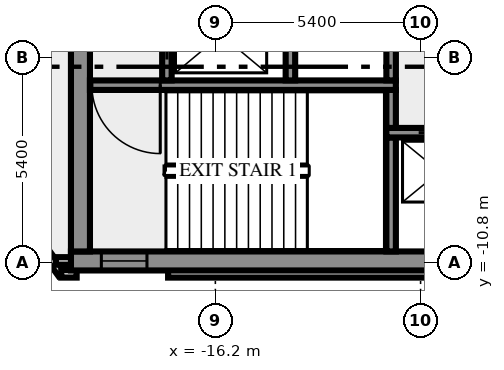
"""IFC4 building model, lengths in metres.
Left out: names, types, materials, properties, quantities, classifications, styles, units other than length and angle.
Written with IfcOpenShell. Run it as: python <this file> out.ifc"""

import sys

from ifc_helpers import new_model, si_unit, direction, frame, frame_2d, origin, place, context, subcontext, project, spatial, rectangle, extrude, element, fill, save


model = new_model("IFC4")
c1 = context("Model", 3, precision=1e-05, world=origin(), true_north=direction((0.0, 1.0)))
c2 = subcontext(c1, "Body", "Model", "MODEL_VIEW")
j1 = project(units=[si_unit("LENGTHUNIT", "METRE"), si_unit("PLANEANGLEUNIT", "RADIAN")], contexts=[c1])
p1 = place(None, origin())
s1 = spatial("IfcSite", under=j1, at=p1, CompositionType="ELEMENT")
p2 = place(p1, origin())
s2 = spatial("IfcBuilding", under=s1, at=p2, CompositionType="ELEMENT")
p3 = place(p2, frame((0.0, 0.0, 51.0)))
s3 = spatial("IfcBuildingStorey", under=s2, at=p3, CompositionType="ELEMENT", Elevation=51.0)
p4 = place(p3, frame((-21.833, -8.909, 0.0), z_axis=(0.0, 0.0, 1.0), x_axis=(0.587766567315, -0.809030569476, 0.0)))
e1 = element("IfcWall", 1, at=p4, inside=s3, PredefinedType="SOLIDWALL", context=c2, shape_type="SweptSolid", body=[
    extrude(rectangle(XDim=2.688, YDim=0.2, at=frame_2d((1.344, 0.0))), origin(), (0.0, 0.0, 1.0), 3.65),
])
p5 = place(p3, frame((-20.256, -11.088, 0.0), z_axis=(0.0, 0.0, 1.0), x_axis=(1.0, 0.0, 0.0)))
e2 = element("IfcWall", 2, at=p5, inside=s3, PredefinedType="SOLIDWALL", context=c2, shape_type="SweptSolid", body=[
    extrude(rectangle(XDim=0.406, YDim=0.2, at=frame_2d((0.203, 0.0))), origin(), (0.0, 0.0, 1.0), 3.65),
])
p6 = place(p3, frame((-17.444, -11.088, 0.0), z_axis=(0.0, 0.0, 1.0), x_axis=(1.0, 0.0, 0.0)))
e3 = element("IfcWall", 3, at=p6, inside=s3, PredefinedType="SOLIDWALL", context=c2, shape_type="SweptSolid", body=[
    extrude(rectangle(XDim=34.888, YDim=0.2, at=frame_2d((17.444, 0.0))), origin(), (0.0, 0.0, 1.0), 3.65),
])
p7 = place(p3, frame((-19.98, -10.75, 0.0), z_axis=(0.0, 0.0, 1.0), x_axis=(-1.0, 0.0, 0.0)))
e4 = element("IfcWall", 4, at=p7, inside=s3, PredefinedType="SOLIDWALL", context=c2, shape_type="SweptSolid", body=[
    extrude(rectangle(XDim=0.417, YDim=0.2, at=frame_2d((0.208, 0.0))), origin(), (0.0, 0.0, 1.0), 3.65),
])
p8 = place(p3, frame((-20.0, -10.75, 0.0), z_axis=(0.0, 0.0, 1.0), x_axis=(1.0, 0.0, 0.0)))
e5 = element("IfcWall", 5, at=p8, inside=s3, PredefinedType="SHEAR", context=c2, shape_type="SweptSolid", body=[
    extrude(rectangle(XDim=40.0, YDim=0.5, at=frame_2d((20.0, 0.0))), origin(), (0.0, 0.0, 1.0), 3.65),
])
p9 = place(p8, frame((0.8, 0.0, 1.0)))
e6 = element("IfcOpeningElement", 6, at=p9, cuts=e5, PredefinedType="OPENING", context=c2, shape_type="SweptSolid", body=[
    extrude(rectangle(XDim=1.2, YDim=1.2, at=frame_2d((0.6, 0.6))), frame((0.0, 0.26, 0.0), z_axis=(0.0, -1.0, 0.0), x_axis=(1.0, 0.0, 0.0)), (0.0, 0.0, 1.0), 0.52),
])
p10 = place(p8, frame((38.0, 0.0, 1.0)))
e7 = element("IfcOpeningElement", 7, at=p10, cuts=e5, PredefinedType="OPENING", context=c2, shape_type="SweptSolid", body=[
    extrude(rectangle(XDim=1.2, YDim=1.2, at=frame_2d((0.6, 0.6))), frame((0.0, 0.26, 0.0), z_axis=(0.0, -1.0, 0.0), x_axis=(1.0, 0.0, 0.0)), (0.0, 0.0, 1.0), 0.52),
])
p11 = place(p3, frame((-19.75, -10.5, 0.0), z_axis=(0.0, 0.0, 1.0), x_axis=(0.0, 1.0, 0.0)))
e8 = element("IfcWall", 8, at=p11, inside=s3, PredefinedType="SHEAR", context=c2, shape_type="SweptSolid", body=[
    extrude(rectangle(XDim=8.8, YDim=0.5, at=frame_2d((4.4, 0.0))), origin(), (0.0, 0.0, 1.0), 3.65),
])
p12 = place(p3, frame((-11.575, -10.5, 0.0), z_axis=(0.0, 0.0, 1.0), x_axis=(0.0, 1.0, 0.0)))
e9 = element("IfcWall", 9, at=p12, inside=s3, PredefinedType="SHEAR", context=c2, shape_type="SweptSolid", body=[
    extrude(rectangle(XDim=3.0, YDim=0.25, at=frame_2d((1.5, 0.0))), origin(), (0.0, 0.0, 1.0), 3.65),
])
p13 = place(p3, frame((11.7, -7.375, 0.0), z_axis=(0.0, 0.0, 1.0), x_axis=(-1.0, 0.0, 0.0)))
e10 = element("IfcWall", 10, at=p13, inside=s3, PredefinedType="SHEAR", context=c2, shape_type="SweptSolid", body=[
    extrude(rectangle(XDim=23.4, YDim=0.25, at=frame_2d((11.7, 0.0))), origin(), (0.0, 0.0, 1.0), 3.65),
])
p14 = place(p13, frame((21.45, 0.0, 0.0)))
e11 = element("IfcOpeningElement", 11, at=p14, cuts=e10, PredefinedType="OPENING", context=c2, shape_type="SweptSolid", body=[
    extrude(rectangle(XDim=1.1, YDim=2.1, at=frame_2d((0.55, 1.05))), frame((0.0, 0.135, 0.0), z_axis=(0.0, -1.0, 0.0), x_axis=(1.0, 0.0, 0.0)), (0.0, 0.0, 1.0), 0.27),
])
p15 = place(p13, frame((18.95, 0.0, 0.0)))
e12 = element("IfcOpeningElement", 12, at=p15, cuts=e10, PredefinedType="OPENING", context=c2, shape_type="SweptSolid", body=[
    extrude(rectangle(XDim=1.1, YDim=2.1, at=frame_2d((0.55, 1.05))), frame((0.0, 0.135, 0.0), z_axis=(0.0, -1.0, 0.0), x_axis=(1.0, 0.0, 0.0)), (0.0, 0.0, 1.0), 0.27),
])
p16 = place(p13, frame((16.45, 0.0, 0.0)))
e13 = element("IfcOpeningElement", 13, at=p16, cuts=e10, PredefinedType="OPENING", context=c2, shape_type="SweptSolid", body=[
    extrude(rectangle(XDim=1.1, YDim=2.1, at=frame_2d((0.55, 1.05))), frame((0.0, 0.135, 0.0), z_axis=(0.0, -1.0, 0.0), x_axis=(1.0, 0.0, 0.0)), (0.0, 0.0, 1.0), 0.27),
])
p17 = place(p13, frame((13.875, 0.0, 0.0)))
e14 = element("IfcOpeningElement", 14, at=p17, cuts=e10, PredefinedType="OPENING", context=c2, shape_type="SweptSolid", body=[
    extrude(rectangle(XDim=0.9, YDim=2.1, at=frame_2d((0.45, 1.05))), frame((0.0, 0.135, 0.0), z_axis=(0.0, -1.0, 0.0), x_axis=(1.0, 0.0, 0.0)), (0.0, 0.0, 1.0), 0.27),
])
p18 = place(p13, frame((11.1, 0.0, 0.0)))
e15 = element("IfcOpeningElement", 15, at=p18, cuts=e10, PredefinedType="OPENING", context=c2, shape_type="SweptSolid", body=[
    extrude(rectangle(XDim=0.9, YDim=2.1, at=frame_2d((0.45, 1.05))), frame((0.0, 0.135, 0.0), z_axis=(0.0, -1.0, 0.0), x_axis=(1.0, 0.0, 0.0)), (0.0, 0.0, 1.0), 0.27),
])
p19 = place(p3, frame((-11.575, -7.25, 0.0), z_axis=(0.0, 0.0, 1.0), x_axis=(0.0, 1.0, 0.0)))
e16 = element("IfcWall", 16, at=p19, inside=s3, PredefinedType="SHEAR", context=c2, shape_type="SweptSolid", body=[
    extrude(rectangle(XDim=1.0, YDim=0.25, at=frame_2d((0.5, 0.0))), origin(), (0.0, 0.0, 1.0), 3.65),
])
p20 = place(p3, frame((-11.45, -6.125, 0.0), z_axis=(0.0, 0.0, 1.0), x_axis=(-1.0, 0.0, 0.0)))
e17 = element("IfcWall", 17, at=p20, inside=s3, PredefinedType="SHEAR", context=c2, shape_type="SweptSolid", body=[
    extrude(rectangle(XDim=8.05, YDim=0.25, at=frame_2d((4.025, 0.0))), origin(), (0.0, 0.0, 1.0), 3.65),
])
p21 = place(p20, frame((6.2, 0.0, 0.0)))
e18 = element("IfcOpeningElement", 18, at=p21, cuts=e17, PredefinedType="OPENING", context=c2, shape_type="SweptSolid", body=[
    extrude(rectangle(XDim=1.8, YDim=2.1, at=frame_2d((0.9, 1.05))), frame((0.0, 0.135, 0.0), z_axis=(0.0, -1.0, 0.0), x_axis=(1.0, 0.0, 0.0)), (0.0, 0.0, 1.0), 0.27),
])
p22 = place(p3, frame((-17.475, -6.0, 0.0), z_axis=(0.0, 0.0, 1.0), x_axis=(0.0, 1.0, 0.0)))
e19 = element("IfcWall", 19, at=p22, inside=s3, PredefinedType="SHEAR", context=c2, shape_type="SweptSolid", body=[
    extrude(rectangle(XDim=4.3, YDim=0.25, at=frame_2d((2.15, 0.0))), origin(), (0.0, 0.0, 1.0), 3.65),
])
p23 = place(p22, frame((0.55, 0.0, 0.0)))
e20 = element("IfcOpeningElement", 20, at=p23, cuts=e19, PredefinedType="OPENING", context=c2, shape_type="SweptSolid", body=[
    extrude(rectangle(XDim=1.3, YDim=2.1, at=frame_2d((0.65, 1.05))), frame((0.0, 0.135, 0.0), z_axis=(0.0, -1.0, 0.0), x_axis=(1.0, 0.0, 0.0)), (0.0, 0.0, 1.0), 0.27),
])
for number, where, z_axis, x_axis in (
    (21, (-14.225, -6.0, 0.0), (0.0, 0.0, 1.0), (0.0, 1.0, 0.0)),
    (22, (-11.575, -6.0, 0.0), (0.0, 0.0, 1.0), (0.0, 1.0, 0.0)),
):
    element("IfcWall", number, at=place(p3, frame(where, z_axis=z_axis, x_axis=x_axis)), inside=s3, PredefinedType="SHEAR", context=c2, shape_type="SweptSolid", body=[
        extrude(rectangle(XDim=1.75, YDim=0.25, at=frame_2d((0.875, 0.0))), origin(), (0.0, 0.0, 1.0), 3.65),
    ])
p24 = place(p9, origin())
e23 = element("IfcWindow", 23, at=p24, inside=s3, PartitioningType="SINGLE_PANEL", PredefinedType="WINDOW", context=c2, shape_type="SweptSolid", body=[
    extrude(rectangle(XDim=1.2, YDim=1.2, at=frame_2d((0.6, 0.6))), frame((0.0, 0.03, 0.0), z_axis=(0.0, -1.0, 0.0), x_axis=(1.0, 0.0, 0.0)), (0.0, 0.0, 1.0), 0.06),
])
fill(e6, e23)
p25 = place(p14, origin())
e24 = element("IfcDoor", 24, at=p25, inside=s3, OperationType="DOUBLE_DOOR_SLIDING", PredefinedType="DOOR", context=c2, shape_type="SweptSolid", body=[
    extrude(rectangle(XDim=1.1, YDim=2.1, at=frame_2d((0.55, 1.05))), frame((0.0, 0.025, 0.0), z_axis=(0.0, -1.0, 0.0), x_axis=(1.0, 0.0, 0.0)), (0.0, 0.0, 1.0), 0.05),
])
fill(e11, e24)
p26 = place(p21, origin())
e25 = element("IfcDoor", 25, at=p26, inside=s3, OperationType="DOUBLE_DOOR_SINGLE_SWING", PredefinedType="DOOR", context=c2, shape_type="SweptSolid", body=[
    extrude(rectangle(XDim=1.8, YDim=2.1, at=frame_2d((0.9, 1.05))), frame((0.0, 0.025, 0.0), z_axis=(0.0, -1.0, 0.0), x_axis=(1.0, 0.0, 0.0)), (0.0, 0.0, 1.0), 0.05),
])
fill(e18, e25)
p27 = place(p23, origin())
e26 = element("IfcDoor", 26, at=p27, inside=s3, OperationType="DOUBLE_DOOR_SLIDING", PredefinedType="DOOR", context=c2, shape_type="SweptSolid", body=[
    extrude(rectangle(XDim=1.3, YDim=2.1, at=frame_2d((0.65, 1.05))), frame((0.0, 0.025, 0.0), z_axis=(0.0, -1.0, 0.0), x_axis=(1.0, 0.0, 0.0)), (0.0, 0.0, 1.0), 0.05),
])
fill(e20, e26)
save(model, sys.argv[1])
